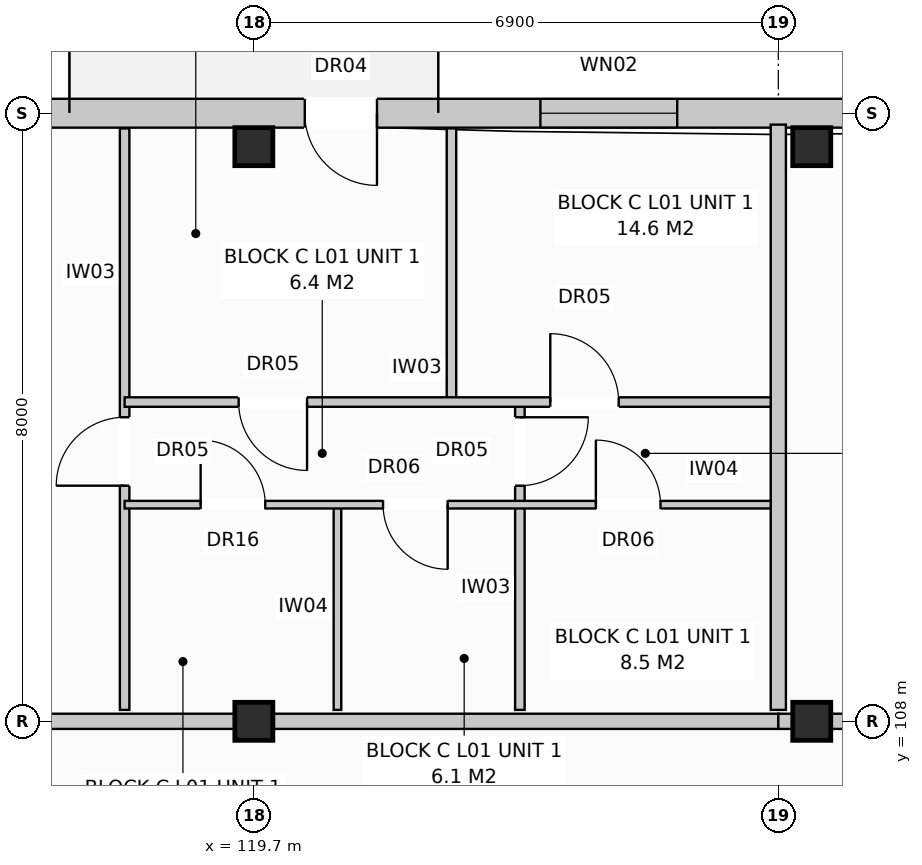
"""IFC4 building model, lengths in metres.
Left out: names, types, materials, properties, quantities, classifications, styles, units other than length and angle.
Written with IfcOpenShell. Run it as: python <this file> out.ifc"""

import sys

from ifc_helpers import new_model, si_unit, direction, frame, frame_2d, origin, origin_with_axes, origin_2d, place, context, subcontext, project, spatial, rectangle, extrude, element, fill, save


model = new_model("IFC4")
c1 = context("Model", 3, precision=1e-05, world=origin(), true_north=direction((0.0, 1.0)))
c2 = subcontext(c1, "Body", "Model", "MODEL_VIEW")
j1 = project(units=[si_unit("LENGTHUNIT", "METRE"), si_unit("PLANEANGLEUNIT", "RADIAN")], contexts=[c1])
p1 = place(None, origin())
s1 = spatial("IfcSite", under=j1, at=p1, CompositionType="ELEMENT")
p2 = place(p1, origin())
s2 = spatial("IfcBuilding", under=s1, at=p2, CompositionType="ELEMENT")
p3 = place(p2, frame((0.0, 0.0, 4.4)))
s3 = spatial("IfcBuildingStorey", under=s2, at=p3, CompositionType="ELEMENT", Elevation=4.4)
for number, where, z_axis, x_axis in (
    (1, (119.7, 108.0, 0.0), (0.0, 0.0, 1.0), (1.0, 0.0, 0.0)),
    (2, (119.7, 115.56, 0.0), (0.0, 0.0, 1.0), (1.0, 0.0, 0.0)),
    (3, (127.04, 108.0, 0.0), (0.0, 0.0, 1.0), (1.0, 0.0, 0.0)),
    (4, (127.04, 115.56, 0.0), (0.0, 0.0, 1.0), (1.0, 0.0, 0.0)),
):
    element("IfcColumn", number, at=place(p3, frame(where, z_axis=z_axis, x_axis=x_axis)), inside=s3, PredefinedType="COLUMN", context=c2, shape_type="SweptSolid", body=[
        extrude(rectangle(XDim=0.5, YDim=0.5, at=origin_2d()), origin(), (0.0, 0.0, 1.0), 3.6),
    ])
p4 = place(p3, frame((112.98, 116.0, 0.0), z_axis=(0.0, 0.0, 1.0), x_axis=(1.0, 0.0, 0.0)))
e5 = element("IfcWall", 5, at=p4, inside=s3, PredefinedType="STANDARD", context=c2, shape_type="SweptSolid", body=[
    extrude(rectangle(XDim=54.84, YDim=0.38, at=frame_2d((27.42, 0.0))), origin(), (0.0, 0.0, 1.0), 3.33),
])
p5 = place(p4, frame((7.39, 0.0, 0.0)))
e6 = element("IfcOpeningElement", 6, at=p5, cuts=e5, PredefinedType="OPENING", context=c2, shape_type="SweptSolid", body=[
    extrude(rectangle(XDim=0.95, YDim=2.1, at=frame_2d((0.475, 1.05))), frame((0.0, 0.202, 0.0), z_axis=(0.0, -1.0, 0.0), x_axis=(1.0, 0.0, 0.0)), (0.0, 0.0, 1.0), 0.404),
])
p6 = place(p4, frame((18.708, 0.0, 0.0)))
e7 = element("IfcOpeningElement", 7, at=p6, cuts=e5, PredefinedType="OPENING", context=c2, shape_type="SweptSolid", body=[
    extrude(rectangle(XDim=0.95, YDim=2.1, at=frame_2d((0.475, 1.05))), frame((0.0, 0.202, 0.0), z_axis=(0.0, -1.0, 0.0), x_axis=(1.0, 0.0, 0.0)), (0.0, 0.0, 1.0), 0.404),
])
p7 = place(p4, frame((32.708, 0.0, 0.0)))
e8 = element("IfcOpeningElement", 8, at=p7, cuts=e5, PredefinedType="OPENING", context=c2, shape_type="SweptSolid", body=[
    extrude(rectangle(XDim=0.95, YDim=2.1, at=frame_2d((0.475, 1.05))), frame((0.0, 0.202, 0.0), z_axis=(0.0, -1.0, 0.0), x_axis=(1.0, 0.0, 0.0)), (0.0, 0.0, 1.0), 0.404),
])
p8 = place(p4, frame((46.508, 0.0, 0.0)))
e9 = element("IfcOpeningElement", 9, at=p8, cuts=e5, PredefinedType="OPENING", context=c2, shape_type="SweptSolid", body=[
    extrude(rectangle(XDim=0.95, YDim=2.1, at=frame_2d((0.475, 1.05))), frame((0.0, 0.202, 0.0), z_axis=(0.0, -1.0, 0.0), x_axis=(1.0, 0.0, 0.0)), (0.0, 0.0, 1.0), 0.404),
])
p9 = place(p4, frame((1.515, 0.0, 0.8)))
e10 = element("IfcOpeningElement", 10, at=p9, cuts=e5, PredefinedType="OPENING", context=c2, shape_type="SweptSolid", body=[
    extrude(rectangle(XDim=1.95, YDim=1.65, at=frame_2d((0.975, 0.825))), frame((0.0, 0.202, 0.0), z_axis=(0.0, -1.0, 0.0), x_axis=(1.0, 0.0, 0.0)), (0.0, 0.0, 1.0), 0.404),
])
p10 = place(p4, frame((10.49, 0.0, 0.8)))
e11 = element("IfcOpeningElement", 11, at=p10, cuts=e5, PredefinedType="OPENING", context=c2, shape_type="SweptSolid", body=[
    extrude(rectangle(XDim=1.8, YDim=1.7, at=frame_2d((0.9, 0.85))), frame((0.0, 0.202, 0.0), z_axis=(0.0, -1.0, 0.0), x_axis=(1.0, 0.0, 0.0)), (0.0, 0.0, 1.0), 0.404),
])
p11 = place(p4, frame((15.84, 0.0, 0.8)))
e12 = element("IfcOpeningElement", 12, at=p11, cuts=e5, PredefinedType="OPENING", context=c2, shape_type="SweptSolid", body=[
    extrude(rectangle(XDim=1.9, YDim=1.85, at=frame_2d((0.95, 0.925))), frame((0.0, 0.202, 0.0), z_axis=(0.0, -1.0, 0.0), x_axis=(1.0, 0.0, 0.0)), (0.0, 0.0, 1.0), 0.404),
])
p12 = place(p4, frame((21.515, 0.0, 0.8)))
e13 = element("IfcOpeningElement", 13, at=p12, cuts=e5, PredefinedType="OPENING", context=c2, shape_type="SweptSolid", body=[
    extrude(rectangle(XDim=1.95, YDim=1.65, at=frame_2d((0.975, 0.825))), frame((0.0, 0.202, 0.0), z_axis=(0.0, -1.0, 0.0), x_axis=(1.0, 0.0, 0.0)), (0.0, 0.0, 1.0), 0.404),
])
p13 = place(p4, frame((27.99, 0.0, 0.8)))
e14 = element("IfcOpeningElement", 14, at=p13, cuts=e5, PredefinedType="OPENING", context=c2, shape_type="SweptSolid", body=[
    extrude(rectangle(XDim=1.8, YDim=1.7, at=frame_2d((0.9, 0.85))), frame((0.0, 0.202, 0.0), z_axis=(0.0, -1.0, 0.0), x_axis=(1.0, 0.0, 0.0)), (0.0, 0.0, 1.0), 0.404),
])
p14 = place(p4, frame((30.54, 0.0, 0.8)))
e15 = element("IfcOpeningElement", 15, at=p14, cuts=e5, PredefinedType="OPENING", context=c2, shape_type="SweptSolid", body=[
    extrude(rectangle(XDim=1.9, YDim=1.85, at=frame_2d((0.95, 0.925))), frame((0.0, 0.202, 0.0), z_axis=(0.0, -1.0, 0.0), x_axis=(1.0, 0.0, 0.0)), (0.0, 0.0, 1.0), 0.404),
])
p15 = place(p4, frame((35.515, 0.0, 0.8)))
e16 = element("IfcOpeningElement", 16, at=p15, cuts=e5, PredefinedType="OPENING", context=c2, shape_type="SweptSolid", body=[
    extrude(rectangle(XDim=1.95, YDim=1.65, at=frame_2d((0.975, 0.825))), frame((0.0, 0.202, 0.0), z_axis=(0.0, -1.0, 0.0), x_axis=(1.0, 0.0, 0.0)), (0.0, 0.0, 1.0), 0.404),
])
p16 = place(p4, frame((38.89, 0.0, 0.8)))
e17 = element("IfcOpeningElement", 17, at=p16, cuts=e5, PredefinedType="OPENING", context=c2, shape_type="SweptSolid", body=[
    extrude(rectangle(XDim=1.8, YDim=1.7, at=frame_2d((0.9, 0.85))), frame((0.0, 0.202, 0.0), z_axis=(0.0, -1.0, 0.0), x_axis=(1.0, 0.0, 0.0)), (0.0, 0.0, 1.0), 0.404),
])
p17 = place(p4, frame((44.34, 0.0, 0.8)))
e18 = element("IfcOpeningElement", 18, at=p17, cuts=e5, PredefinedType="OPENING", context=c2, shape_type="SweptSolid", body=[
    extrude(rectangle(XDim=1.9, YDim=1.85, at=frame_2d((0.95, 0.925))), frame((0.0, 0.202, 0.0), z_axis=(0.0, -1.0, 0.0), x_axis=(1.0, 0.0, 0.0)), (0.0, 0.0, 1.0), 0.404),
])
p18 = place(p4, frame((49.115, 0.0, 0.8)))
e19 = element("IfcOpeningElement", 19, at=p18, cuts=e5, PredefinedType="OPENING", context=c2, shape_type="SweptSolid", body=[
    extrude(rectangle(XDim=1.95, YDim=1.65, at=frame_2d((0.975, 0.825))), frame((0.0, 0.202, 0.0), z_axis=(0.0, -1.0, 0.0), x_axis=(1.0, 0.0, 0.0)), (0.0, 0.0, 1.0), 0.404),
])
p19 = place(p4, frame((52.405, 0.0, 0.8)))
e20 = element("IfcOpeningElement", 20, at=p19, cuts=e5, PredefinedType="OPENING", context=c2, shape_type="SweptSolid", body=[
    extrude(rectangle(XDim=1.8, YDim=1.7, at=frame_2d((0.9, 0.85))), frame((0.0, 0.202, 0.0), z_axis=(0.0, -1.0, 0.0), x_axis=(1.0, 0.0, 0.0)), (0.0, 0.0, 1.0), 0.404),
])
p20 = place(p3, frame((126.6, 108.15, 0.0), z_axis=(0.0, 0.0, 1.0), x_axis=(0.0, 1.0, 0.0)))
e21 = element("IfcWall", 21, at=p20, inside=s3, PredefinedType="PARTITIONING", context=c2, shape_type="SweptSolid", body=[
    extrude(rectangle(XDim=7.7, YDim=0.2, at=frame_2d((3.85, 0.0))), origin(), (0.0, 0.0, 1.0), 3.33),
])
p21 = place(p3, frame((112.8, 108.0, 0.0), z_axis=(0.0, 0.0, 1.0), x_axis=(1.0, 0.0, 0.0)))
e22 = element("IfcWall", 22, at=p21, inside=s3, PredefinedType="PARTITIONING", context=c2, shape_type="SweptSolid", body=[
    extrude(rectangle(XDim=13.8, YDim=0.2, at=frame_2d((6.9, 0.0))), origin(), (0.0, 0.0, 1.0), 2.77),
])
p22 = place(p21, frame((2.4, 0.0, 0.0)))
e23 = element("IfcOpeningElement", 23, at=p22, cuts=e22, PredefinedType="OPENING", context=c2, shape_type="SweptSolid", body=[
    extrude(rectangle(XDim=0.95, YDim=2.15, at=frame_2d((0.475, 1.075))), frame((0.0, 0.112, 0.0), z_axis=(0.0, -1.0, 0.0), x_axis=(1.0, 0.0, 0.0)), (0.0, 0.0, 1.0), 0.224),
])
p23 = place(p3, frame((118.0, 108.15, 0.0), z_axis=(0.0, 0.0, 1.0), x_axis=(0.0, 1.0, 0.0)))
e24 = element("IfcWall", 24, at=p23, inside=s3, PredefinedType="PARTITIONING", context=c2, shape_type="SweptSolid", body=[
    extrude(rectangle(XDim=7.65, YDim=0.125, at=frame_2d((3.825, 0.0))), origin(), (0.0, 0.0, 1.0), 3.33),
])
p24 = place(p23, frame((2.95, 0.0, 0.0)))
e25 = element("IfcOpeningElement", 25, at=p24, cuts=e24, PredefinedType="OPENING", context=c2, shape_type="SweptSolid", body=[
    extrude(rectangle(XDim=0.9, YDim=2.1, at=frame_2d((0.45, 1.05))), frame((0.0, 0.074, 0.0), z_axis=(0.0, -1.0, 0.0), x_axis=(1.0, 0.0, 0.0)), (0.0, 0.0, 1.0), 0.149),
])
p25 = place(p3, frame((120.8, 108.15, 0.0), z_axis=(0.0, 0.0, 1.0), x_axis=(0.0, 1.0, 0.0)))
e26 = element("IfcWall", 26, at=p25, inside=s3, PredefinedType="PARTITIONING", context=c2, shape_type="SweptSolid", body=[
    extrude(rectangle(XDim=2.7, YDim=0.1, at=frame_2d((1.35, 0.0))), origin(), (0.0, 0.0, 1.0), 3.33),
])
p26 = place(p3, frame((123.2, 108.15, 0.0), z_axis=(0.0, 0.0, 1.0), x_axis=(0.0, 1.0, 0.0)))
e27 = element("IfcWall", 27, at=p26, inside=s3, PredefinedType="PARTITIONING", context=c2, shape_type="SweptSolid", body=[
    extrude(rectangle(XDim=4.05, YDim=0.125, at=frame_2d((2.025, 0.0))), origin(), (0.0, 0.0, 1.0), 2.99),
])
p27 = place(p26, frame((2.95, 0.0, 0.0)))
e28 = element("IfcOpeningElement", 28, at=p27, cuts=e27, PredefinedType="OPENING", context=c2, shape_type="SweptSolid", body=[
    extrude(rectangle(XDim=0.9, YDim=2.1, at=frame_2d((0.45, 1.05))), frame((0.0, 0.074, 0.0), z_axis=(0.0, -1.0, 0.0), x_axis=(1.0, 0.0, 0.0)), (0.0, 0.0, 1.0), 0.149),
])
p28 = place(p3, frame((122.3, 112.2, 0.0), z_axis=(0.0, 0.0, 1.0), x_axis=(0.0, 1.0, 0.0)))
e29 = element("IfcWall", 29, at=p28, inside=s3, PredefinedType="PARTITIONING", context=c2, shape_type="SweptSolid", body=[
    extrude(rectangle(XDim=3.6, YDim=0.125, at=frame_2d((1.8, 0.0))), origin(), (0.0, 0.0, 1.0), 3.33),
])
p29 = place(p3, frame((118.0, 110.85, 0.0), z_axis=(0.0, 0.0, 1.0), x_axis=(1.0, 0.0, 0.0)))
e30 = element("IfcWall", 30, at=p29, inside=s3, PredefinedType="PARTITIONING", context=c2, shape_type="SweptSolid", body=[
    extrude(rectangle(XDim=8.5, YDim=0.1, at=frame_2d((4.25, 0.0))), origin(), (0.0, 0.0, 1.0), 3.33),
])
p30 = place(p29, frame((1.0, 0.0, 0.0)))
e31 = element("IfcOpeningElement", 31, at=p30, cuts=e30, PredefinedType="OPENING", context=c2, shape_type="SweptSolid", body=[
    extrude(rectangle(XDim=0.85, YDim=2.1, at=frame_2d((0.425, 1.05))), frame((0.0, 0.062, 0.0), z_axis=(0.0, -1.0, 0.0), x_axis=(1.0, 0.0, 0.0)), (0.0, 0.0, 1.0), 0.124),
])
p31 = place(p29, frame((3.4, 0.0, 0.0)))
e32 = element("IfcOpeningElement", 32, at=p31, cuts=e30, PredefinedType="OPENING", context=c2, shape_type="SweptSolid", body=[
    extrude(rectangle(XDim=0.85, YDim=2.05, at=frame_2d((0.425, 1.025))), frame((0.0, 0.062, 0.0), z_axis=(0.0, -1.0, 0.0), x_axis=(1.0, 0.0, 0.0)), (0.0, 0.0, 1.0), 0.124),
])
p32 = place(p29, frame((6.2, 0.0, 0.0)))
e33 = element("IfcOpeningElement", 33, at=p32, cuts=e30, PredefinedType="OPENING", context=c2, shape_type="SweptSolid", body=[
    extrude(rectangle(XDim=0.85, YDim=2.05, at=frame_2d((0.425, 1.025))), frame((0.0, 0.062, 0.0), z_axis=(0.0, -1.0, 0.0), x_axis=(1.0, 0.0, 0.0)), (0.0, 0.0, 1.0), 0.124),
])
p33 = place(p3, frame((118.0, 112.2, 0.0), z_axis=(0.0, 0.0, 1.0), x_axis=(1.0, 0.0, 0.0)))
e34 = element("IfcWall", 34, at=p33, inside=s3, PredefinedType="PARTITIONING", context=c2, shape_type="SweptSolid", body=[
    extrude(rectangle(XDim=8.5, YDim=0.125, at=frame_2d((4.25, 0.0))), origin(), (0.0, 0.0, 1.0), 3.33),
])
p34 = place(p33, frame((1.5, 0.0, 0.0)))
e35 = element("IfcOpeningElement", 35, at=p34, cuts=e34, PredefinedType="OPENING", context=c2, shape_type="SweptSolid", body=[
    extrude(rectangle(XDim=0.9, YDim=2.1, at=frame_2d((0.45, 1.05))), frame((0.0, 0.074, 0.0), z_axis=(0.0, -1.0, 0.0), x_axis=(1.0, 0.0, 0.0)), (0.0, 0.0, 1.0), 0.149),
])
p35 = place(p33, frame((5.6, 0.0, 0.0)))
e36 = element("IfcOpeningElement", 36, at=p35, cuts=e34, PredefinedType="OPENING", context=c2, shape_type="SweptSolid", body=[
    extrude(rectangle(XDim=0.9, YDim=2.1, at=frame_2d((0.45, 1.05))), frame((0.0, 0.074, 0.0), z_axis=(0.0, -1.0, 0.0), x_axis=(1.0, 0.0, 0.0)), (0.0, 0.0, 1.0), 0.149),
])
p36 = place(p3, frame((126.6, 108.0, 0.0), z_axis=(0.0, 0.0, 1.0), x_axis=(1.0, 0.0, 0.0)))
e37 = element("IfcWall", 37, at=p36, inside=s3, PredefinedType="PARTITIONING", context=c2, shape_type="SweptSolid", body=[
    extrude(rectangle(XDim=20.7, YDim=0.2, at=frame_2d((10.35, 0.0))), origin(), (0.0, 0.0, 1.0), 2.77),
])
p37 = place(p36, frame((2.4, 0.0, 0.0)))
e38 = element("IfcOpeningElement", 38, at=p37, cuts=e37, PredefinedType="OPENING", context=c2, shape_type="SweptSolid", body=[
    extrude(rectangle(XDim=0.95, YDim=2.15, at=frame_2d((0.475, 1.075))), frame((0.0, 0.112, 0.0), z_axis=(0.0, -1.0, 0.0), x_axis=(1.0, 0.0, 0.0)), (0.0, 0.0, 1.0), 0.224),
])
p38 = place(p5, frame((0.95, 0.0, 0.0), z_axis=(0.0, 0.0, 1.0), x_axis=(-1.0, 0.0, 0.0)))
e39 = element("IfcDoor", 39, at=p38, inside=s3, OperationType="SINGLE_SWING_RIGHT", PredefinedType="DOOR", context=c2, shape_type="SweptSolid", body=[
    extrude(rectangle(XDim=0.95, YDim=2.1, at=frame_2d((0.475, 1.05))), frame((0.0, 0.025, 0.0), z_axis=(0.0, -1.0, 0.0), x_axis=(1.0, 0.0, 0.0)), (0.0, 0.0, 1.0), 0.05),
])
fill(e6, e39)
p39 = place(p10, origin_with_axes())
e40 = element("IfcWindow", 40, at=p39, inside=s3, PartitioningType="SINGLE_PANEL", PredefinedType="WINDOW", context=c2, shape_type="SweptSolid", body=[
    extrude(rectangle(XDim=1.8, YDim=1.7, at=frame_2d((0.9, 0.85))), frame((0.0, 0.03, 0.0), z_axis=(0.0, -1.0, 0.0), x_axis=(1.0, 0.0, 0.0)), (0.0, 0.0, 1.0), 0.06),
])
fill(e11, e40)
p40 = place(p24, origin_with_axes())
e41 = element("IfcDoor", 41, at=p40, inside=s3, OperationType="SINGLE_SWING_LEFT", PredefinedType="DOOR", context=c2, shape_type="SweptSolid", body=[
    extrude(rectangle(XDim=0.9, YDim=2.1, at=frame_2d((0.45, 1.05))), frame((0.0, 0.025, 0.0), z_axis=(0.0, -1.0, 0.0), x_axis=(1.0, 0.0, 0.0)), (0.0, 0.0, 1.0), 0.05),
])
fill(e25, e41)
p41 = place(p27, frame((0.9, 0.0, 0.0), z_axis=(0.0, 0.0, 1.0), x_axis=(-1.0, 0.0, 0.0)))
e42 = element("IfcDoor", 42, at=p41, inside=s3, OperationType="SINGLE_SWING_RIGHT", PredefinedType="DOOR", context=c2, shape_type="SweptSolid", body=[
    extrude(rectangle(XDim=0.9, YDim=2.1, at=frame_2d((0.45, 1.05))), frame((0.0, 0.025, 0.0), z_axis=(0.0, -1.0, 0.0), x_axis=(1.0, 0.0, 0.0)), (0.0, 0.0, 1.0), 0.05),
])
fill(e28, e42)
p42 = place(p30, origin_with_axes())
e43 = element("IfcDoor", 43, at=p42, inside=s3, OperationType="SINGLE_SWING_LEFT", PredefinedType="DOOR", context=c2, shape_type="SweptSolid", body=[
    extrude(rectangle(XDim=0.85, YDim=2.1, at=frame_2d((0.425, 1.05))), frame((0.0, 0.025, 0.0), z_axis=(0.0, -1.0, 0.0), x_axis=(1.0, 0.0, 0.0)), (0.0, 0.0, 1.0), 0.05),
])
fill(e31, e43)
p43 = place(p31, frame((0.85, 0.0, 0.0), z_axis=(0.0, 0.0, 1.0), x_axis=(-1.0, 0.0, 0.0)))
e44 = element("IfcDoor", 44, at=p43, inside=s3, OperationType="SINGLE_SWING_RIGHT", PredefinedType="DOOR", context=c2, shape_type="SweptSolid", body=[
    extrude(rectangle(XDim=0.85, YDim=2.05, at=frame_2d((0.425, 1.025))), frame((0.0, 0.025, 0.0), z_axis=(0.0, -1.0, 0.0), x_axis=(1.0, 0.0, 0.0)), (0.0, 0.0, 1.0), 0.05),
])
fill(e32, e44)
p44 = place(p32, origin_with_axes())
e45 = element("IfcDoor", 45, at=p44, inside=s3, OperationType="SINGLE_SWING_LEFT", PredefinedType="DOOR", context=c2, shape_type="SweptSolid", body=[
    extrude(rectangle(XDim=0.85, YDim=2.05, at=frame_2d((0.425, 1.025))), frame((0.0, 0.025, 0.0), z_axis=(0.0, -1.0, 0.0), x_axis=(1.0, 0.0, 0.0)), (0.0, 0.0, 1.0), 0.05),
])
fill(e33, e45)
p45 = place(p34, frame((0.9, 0.0, 0.0), z_axis=(0.0, 0.0, 1.0), x_axis=(-1.0, 0.0, 0.0)))
e46 = element("IfcDoor", 46, at=p45, inside=s3, OperationType="SINGLE_SWING_RIGHT", PredefinedType="DOOR", context=c2, shape_type="SweptSolid", body=[
    extrude(rectangle(XDim=0.9, YDim=2.1, at=frame_2d((0.45, 1.05))), frame((0.0, 0.025, 0.0), z_axis=(0.0, -1.0, 0.0), x_axis=(1.0, 0.0, 0.0)), (0.0, 0.0, 1.0), 0.05),
])
fill(e35, e46)
p46 = place(p35, origin_with_axes())
e47 = element("IfcDoor", 47, at=p46, inside=s3, OperationType="SINGLE_SWING_LEFT", PredefinedType="DOOR", context=c2, shape_type="SweptSolid", body=[
    extrude(rectangle(XDim=0.9, YDim=2.1, at=frame_2d((0.45, 1.05))), frame((0.0, 0.025, 0.0), z_axis=(0.0, -1.0, 0.0), x_axis=(1.0, 0.0, 0.0)), (0.0, 0.0, 1.0), 0.05),
])
fill(e36, e47)
save(model, sys.argv[1])
